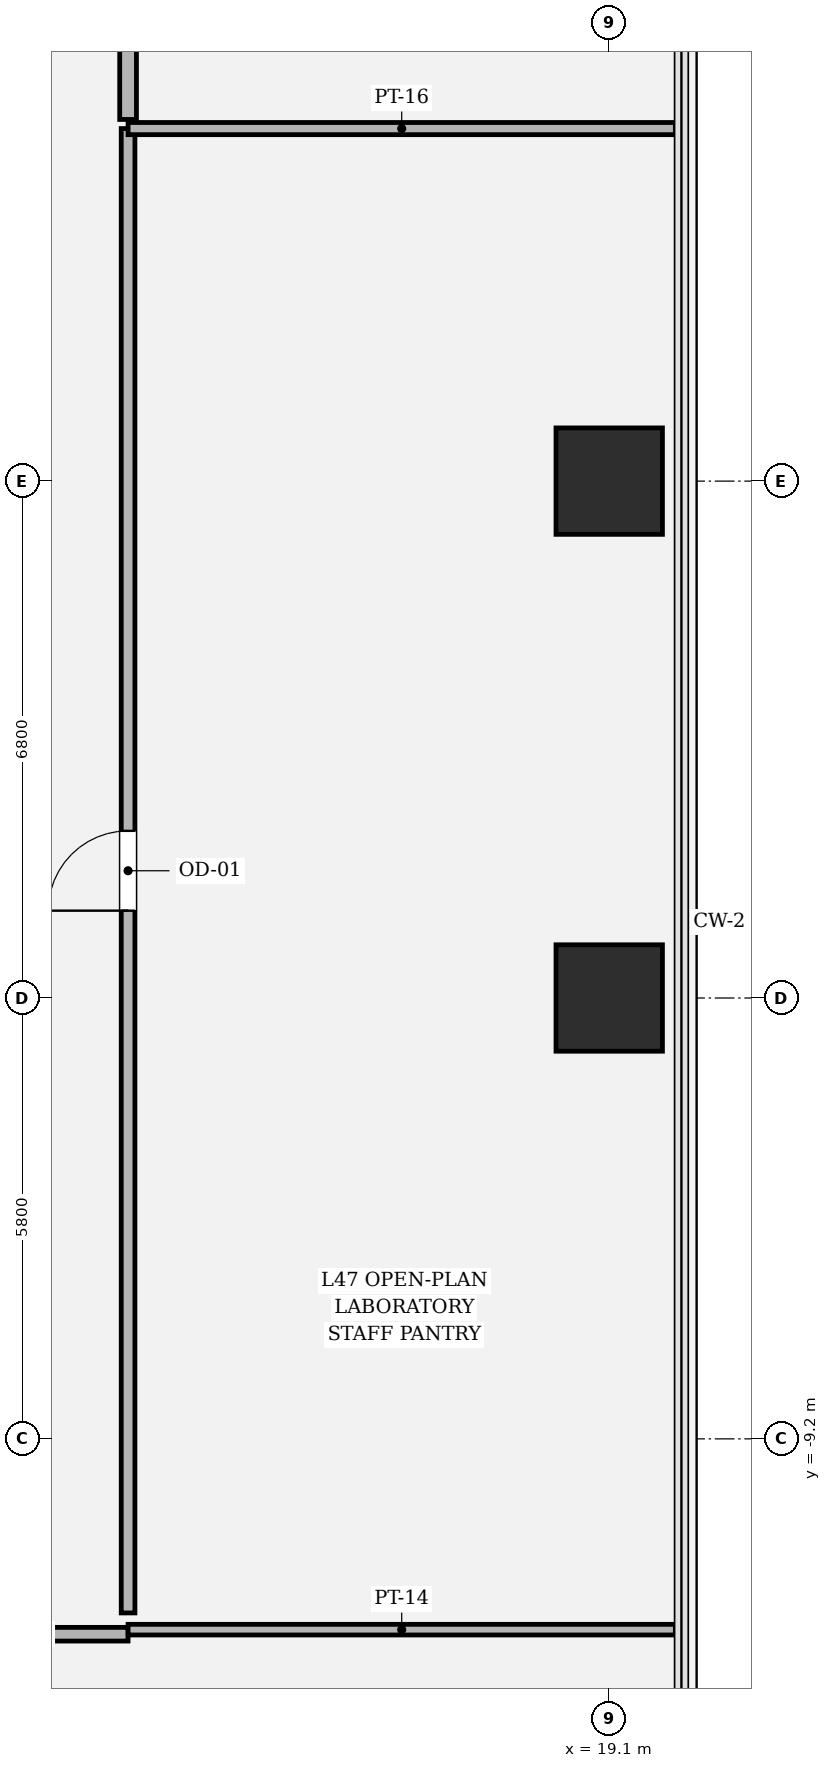
"""IFC4 building model, lengths in metres.
Left out: names, types, materials, properties, quantities, classifications, styles, units other than length and angle.
Written with IfcOpenShell. Run it as: python <this file> out.ifc"""

import sys

from ifc_helpers import new_model, si_unit, direction, frame, frame_2d, origin, origin_2d, place, context, subcontext, project, spatial, rectangle, hollow_rectangle, extrude, element, fill, save


model = new_model("IFC4")
c1 = context("Model", 3, precision=1e-05, world=origin(), true_north=direction((0.0, 1.0)))
c2 = subcontext(c1, "Body", "Model", "MODEL_VIEW")
j1 = project(units=[si_unit("LENGTHUNIT", "METRE"), si_unit("PLANEANGLEUNIT", "RADIAN")], contexts=[c1])
p1 = place(None, origin())
s1 = spatial("IfcSite", under=j1, at=p1, CompositionType="ELEMENT")
p2 = place(p1, origin())
s2 = spatial("IfcBuilding", under=s1, at=p2, CompositionType="ELEMENT")
p3 = place(p2, frame((0.0, 0.0, 200.55)))
s3 = spatial("IfcBuildingStorey", under=s2, at=p3, CompositionType="ELEMENT", Elevation=200.55)
for number, where, z_axis, x_axis in (
    (1, (19.1, -3.4, 0.0), (0.0, 0.0, 1.0), (1.0, 0.0, 0.0)),
    (2, (19.1, 3.4, 0.0), (0.0, 0.0, 1.0), (1.0, 0.0, 0.0)),
):
    element("IfcColumn", number, at=place(p3, frame(where, z_axis=z_axis, x_axis=x_axis)), inside=s3, PredefinedType="COLUMN", context=c2, shape_type="SweptSolid", body=[
        extrude(hollow_rectangle(XDim=1.4, YDim=1.4, WallThickness=0.042, at=origin_2d()), origin(), (0.0, 0.0, 1.0), 4.05),
    ])
p4 = place(p3, frame((8.772, -11.77, 0.0), z_axis=(0.0, 0.0, 1.0), x_axis=(1.0, 0.0, 0.0)))
e3 = element("IfcWall", 3, at=p4, inside=s3, PredefinedType="PARTITIONING", context=c2, shape_type="SweptSolid", body=[
    extrude(rectangle(XDim=3.998, YDim=0.18, at=frame_2d((1.999, 0.0))), origin(), (0.0, 0.0, 1.0), 2.444),
])
p5 = place(p4, frame((1.474, 0.0, 0.0)))
e4 = element("IfcOpeningElement", 4, at=p5, cuts=e3, PredefinedType="OPENING", context=c2, shape_type="SweptSolid", body=[
    extrude(rectangle(XDim=1.05, YDim=2.2, at=frame_2d((0.525, 1.1))), frame((0.0, 0.1, 0.0), z_axis=(0.0, -1.0, 0.0), x_axis=(1.0, 0.0, 0.0)), (0.0, 0.0, 1.0), 0.2),
])
p6 = place(p3, frame((12.77, -11.71, 0.0), z_axis=(0.0, 0.0, 1.0), x_axis=(1.0, 0.0, 0.0)))
e5 = element("IfcWall", 5, at=p6, inside=s3, PredefinedType="PARTITIONING", context=c2, shape_type="SweptSolid", body=[
    extrude(rectangle(XDim=7.2, YDim=0.14, at=frame_2d((3.6, 0.0))), origin(), (0.0, 0.0, 1.0), 2.444),
])
p7 = place(p3, frame((12.77, -11.49, 0.0), z_axis=(0.0, 0.0, 1.0), x_axis=(0.0, 1.0, 0.0)))
e6 = element("IfcWall", 6, at=p7, inside=s3, PredefinedType="PARTITIONING", context=c2, shape_type="SweptSolid", body=[
    extrude(rectangle(XDim=19.528, YDim=0.18, at=frame_2d((9.764, 0.0))), origin(), (0.0, 0.0, 1.0), 2.444),
])
p8 = place(p7, frame((9.239, 0.0, 0.0)))
e7 = element("IfcOpeningElement", 7, at=p8, cuts=e6, PredefinedType="OPENING", context=c2, shape_type="SweptSolid", body=[
    extrude(rectangle(XDim=1.05, YDim=2.2, at=frame_2d((0.525, 1.1))), frame((0.0, 0.1, 0.0), z_axis=(0.0, -1.0, 0.0), x_axis=(1.0, 0.0, 0.0)), (0.0, 0.0, 1.0), 0.2),
])
p9 = place(p3, frame((12.77, 8.038, 0.0), z_axis=(0.0, 0.0, 1.0), x_axis=(1.0, 0.0, 0.0)))
e8 = element("IfcWall", 8, at=p9, inside=s3, PredefinedType="PARTITIONING", context=c2, shape_type="SweptSolid", body=[
    extrude(rectangle(XDim=7.2, YDim=0.16, at=frame_2d((3.6, 0.0))), origin(), (0.0, 0.0, 1.0), 2.444),
])
p10 = place(p3, frame((12.77, 8.158, 0.0), z_axis=(0.0, 0.0, 1.0), x_axis=(0.0, 1.0, 0.0)))
e9 = element("IfcWall", 9, at=p10, inside=s3, PredefinedType="SOLIDWALL", context=c2, shape_type="SweptSolid", body=[
    extrude(rectangle(XDim=10.212, YDim=0.22, at=frame_2d((5.106, 0.0))), origin(), (0.0, 0.0, 1.0), 2.444),
])
p11 = place(p10, frame((4.556, 0.0, 0.0)))
e10 = element("IfcOpeningElement", 10, at=p11, cuts=e9, PredefinedType="OPENING", context=c2, shape_type="SweptSolid", body=[
    extrude(rectangle(XDim=1.1, YDim=2.2, at=frame_2d((0.55, 1.1))), frame((0.0, 0.12, 0.0), z_axis=(0.0, -1.0, 0.0), x_axis=(1.0, 0.0, 0.0)), (0.0, 0.0, 1.0), 0.24),
])
p12 = place(p8, origin())
e11 = element("IfcDoor", 11, at=p12, inside=s3, OperationType="SINGLE_SWING_LEFT", PredefinedType="DOOR", context=c2, shape_type="SweptSolid", body=[
    extrude(rectangle(XDim=1.05, YDim=2.2, at=frame_2d((0.525, 1.1))), frame((0.0, 0.025, 0.0), z_axis=(0.0, -1.0, 0.0), x_axis=(1.0, 0.0, 0.0)), (0.0, 0.0, 1.0), 0.05),
])
fill(e7, e11)
save(model, sys.argv[1])
